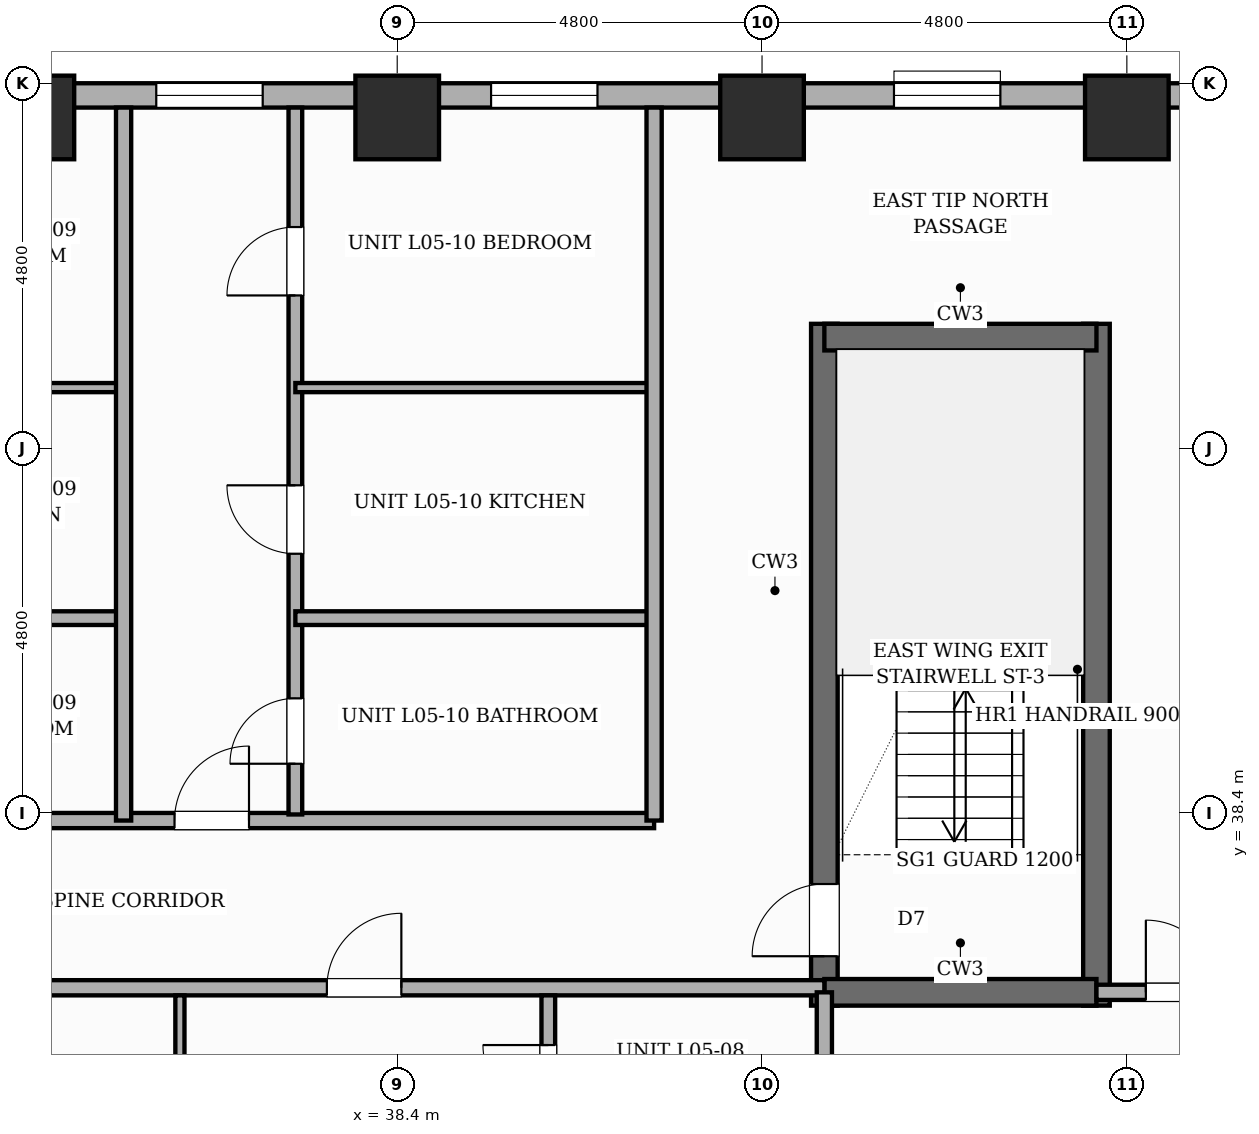
"""IFC4 building model, lengths in metres.
Left out: names, types, materials, properties, quantities, classifications, styles, units other than length and angle.
Written with IfcOpenShell. Run it as: python <this file> out.ifc"""

import sys

from ifc_helpers import new_model, si_unit, direction, frame, frame_2d, origin, origin_2d, place, context, subcontext, project, spatial, rectangle, extrude, element, fill, save


model = new_model("IFC4")
c1 = context("Model", 3, precision=1e-05, world=origin(), true_north=direction((0.0, 1.0)))
c2 = subcontext(c1, "Body", "Model", "MODEL_VIEW")
j1 = project(units=[si_unit("LENGTHUNIT", "METRE"), si_unit("PLANEANGLEUNIT", "RADIAN")], contexts=[c1])
p1 = place(None, origin())
s1 = spatial("IfcSite", under=j1, at=p1, CompositionType="ELEMENT")
p2 = place(p1, origin())
s2 = spatial("IfcBuilding", under=s1, at=p2, CompositionType="ELEMENT")
p3 = place(p2, frame((0.0, 0.0, 25.0)))
s3 = spatial("IfcBuildingStorey", under=s2, at=p3, CompositionType="ELEMENT", Elevation=25.0)
p4 = place(p3, frame((44.02, 35.865, 0.0), z_axis=(0.0, 0.0, 1.0), x_axis=(0.0, 1.0, 0.0)))
e1 = element("IfcWall", 1, at=p4, inside=s3, PredefinedType="SHEAR", context=c2, shape_type="SweptSolid", body=[
    extrude(rectangle(XDim=8.97, YDim=0.35, at=frame_2d((4.485, 0.0))), origin(), (0.0, 0.0, 1.0), 3.6),
])
p5 = place(p4, frame((0.65, 0.0, 0.0)))
e2 = element("IfcOpeningElement", 2, at=p5, cuts=e1, PredefinedType="OPENING", context=c2, shape_type="SweptSolid", body=[
    extrude(rectangle(XDim=0.95, YDim=2.1, at=frame_2d((0.475, 1.05))), frame((0.0, 0.185, 0.0), z_axis=(0.0, -1.0, 0.0), x_axis=(1.0, 0.0, 0.0)), (0.0, 0.0, 1.0), 0.37),
])
p6 = place(p3, frame((47.6, 35.865, 0.0), z_axis=(0.0, 0.0, 1.0), x_axis=(0.0, 1.0, 0.0)))
e3 = element("IfcWall", 3, at=p6, inside=s3, PredefinedType="SHEAR", context=c2, shape_type="SweptSolid", body=[
    extrude(rectangle(XDim=8.97, YDim=0.35, at=frame_2d((4.485, 0.0))), origin(), (0.0, 0.0, 1.0), 3.6),
])
for number, where, z_axis, x_axis in (
    (4, (44.02, 36.04, 0.0), (0.0, 0.0, 1.0), (1.0, 0.0, 0.0)),
    (5, (44.02, 44.66, 0.0), (0.0, 0.0, 1.0), (1.0, 0.0, 0.0)),
):
    element("IfcWall", number, at=place(p3, frame(where, z_axis=z_axis, x_axis=x_axis)), inside=s3, PredefinedType="SHEAR", context=c2, shape_type="SweptSolid", body=[
        extrude(rectangle(XDim=3.58, YDim=0.35, at=frame_2d((1.79, 0.0))), origin(), (0.0, 0.0, 1.0), 3.6),
    ])
for number, where, z_axis, x_axis in (
    (6, (33.6, 47.55, 0.0), (0.0, 0.0, 1.0), (1.0, 0.0, 0.0)),
    (7, (38.4, 47.55, 0.0), (0.0, 0.0, 1.0), (1.0, 0.0, 0.0)),
    (8, (43.2, 47.55, 0.0), (0.0, 0.0, 1.0), (1.0, 0.0, 0.0)),
    (9, (48.0, 47.55, 0.0), (0.0, 0.0, 1.0), (1.0, 0.0, 0.0)),
):
    element("IfcColumn", number, at=place(p3, frame(where, z_axis=z_axis, x_axis=x_axis)), inside=s3, PredefinedType="COLUMN", context=c2, shape_type="SweptSolid", body=[
        extrude(rectangle(XDim=1.1, YDim=1.1, at=origin_2d()), origin(), (0.0, 0.0, 1.0), 3.6),
    ])
p7 = place(p3, frame((7.2, 47.84, 0.0), z_axis=(0.0, 0.0, 1.0), x_axis=(1.0, 0.0, 0.0)))
e10 = element("IfcWall", 10, at=p7, inside=s3, PredefinedType="STANDARD", context=c2, shape_type="SweptSolid", body=[
    extrude(rectangle(XDim=48.0, YDim=0.32, at=frame_2d((24.0, 0.0))), origin(), (0.0, 0.0, 1.0), 2.53),
])
p8 = place(p7, frame((24.97, 0.0, 0.45)))
e11 = element("IfcOpeningElement", 11, at=p8, cuts=e10, PredefinedType="OPENING", context=c2, shape_type="SweptSolid", body=[
    extrude(rectangle(XDim=0.6, YDim=1.8, at=frame_2d((0.3, 0.9))), frame((0.0, 0.17, 0.0), z_axis=(0.0, -1.0, 0.0), x_axis=(1.0, 0.0, 0.0)), (0.0, 0.0, 1.0), 0.34),
])
p9 = place(p7, frame((32.435, 0.0, 0.65)))
e12 = element("IfcOpeningElement", 12, at=p9, cuts=e10, PredefinedType="OPENING", context=c2, shape_type="SweptSolid", body=[
    extrude(rectangle(XDim=1.4, YDim=1.1, at=frame_2d((0.7, 0.55))), frame((0.0, 0.17, 0.0), z_axis=(0.0, -1.0, 0.0), x_axis=(1.0, 0.0, 0.0)), (0.0, 0.0, 1.0), 0.34),
])
p10 = place(p7, frame((47.094, 0.0, 0.45)))
e13 = element("IfcOpeningElement", 13, at=p10, cuts=e10, PredefinedType="OPENING", context=c2, shape_type="SweptSolid", body=[
    extrude(rectangle(XDim=0.6, YDim=1.8, at=frame_2d((0.3, 0.9))), frame((0.0, 0.17, 0.0), z_axis=(0.0, -1.0, 0.0), x_axis=(1.0, 0.0, 0.0)), (0.0, 0.0, 1.0), 0.34),
])
p11 = place(p7, frame((18.74, 0.0, 0.45)))
e14 = element("IfcOpeningElement", 14, at=p11, cuts=e10, PredefinedType="OPENING", context=c2, shape_type="SweptSolid", body=[
    extrude(rectangle(XDim=0.95, YDim=1.8, at=frame_2d((0.475, 0.9))), frame((0.0, 0.17, 0.0), z_axis=(0.0, -1.0, 0.0), x_axis=(1.0, 0.0, 0.0)), (0.0, 0.0, 1.0), 0.34),
])
p12 = place(p7, frame((41.65, 0.0, 0.45)))
e15 = element("IfcOpeningElement", 15, at=p12, cuts=e10, PredefinedType="OPENING", context=c2, shape_type="SweptSolid", body=[
    extrude(rectangle(XDim=0.75, YDim=1.8, at=frame_2d((0.375, 0.9))), frame((0.0, 0.17, 0.0), z_axis=(0.0, -1.0, 0.0), x_axis=(1.0, 0.0, 0.0)), (0.0, 0.0, 1.0), 0.34),
])
p13 = place(p7, frame((37.736, 0.0, 0.65)))
e16 = element("IfcOpeningElement", 16, at=p13, cuts=e10, PredefinedType="OPENING", context=c2, shape_type="SweptSolid", body=[
    extrude(rectangle(XDim=1.4, YDim=1.1, at=frame_2d((0.7, 0.55))), frame((0.0, 0.17, 0.0), z_axis=(0.0, -1.0, 0.0), x_axis=(1.0, 0.0, 0.0)), (0.0, 0.0, 1.0), 0.34),
])
p14 = place(p7, frame((0.47, 0.0, 0.45)))
e17 = element("IfcOpeningElement", 17, at=p14, cuts=e10, PredefinedType="OPENING", context=c2, shape_type="SweptSolid", body=[
    extrude(rectangle(XDim=0.95, YDim=1.8, at=frame_2d((0.475, 0.9))), frame((0.0, 0.17, 0.0), z_axis=(0.0, -1.0, 0.0), x_axis=(1.0, 0.0, 0.0)), (0.0, 0.0, 1.0), 0.34),
])
p15 = place(p7, frame((10.215, 0.0, 0.45)))
e18 = element("IfcOpeningElement", 18, at=p15, cuts=e10, PredefinedType="OPENING", context=c2, shape_type="SweptSolid", body=[
    extrude(rectangle(XDim=0.95, YDim=1.8, at=frame_2d((0.475, 0.9))), frame((0.0, 0.17, 0.0), z_axis=(0.0, -1.0, 0.0), x_axis=(1.0, 0.0, 0.0)), (0.0, 0.0, 1.0), 0.34),
])
p16 = place(p7, frame((22.87, 0.0, 0.65)))
e19 = element("IfcOpeningElement", 19, at=p16, cuts=e10, PredefinedType="OPENING", context=c2, shape_type="SweptSolid", body=[
    extrude(rectangle(XDim=1.4, YDim=1.1, at=frame_2d((0.7, 0.55))), frame((0.0, 0.17, 0.0), z_axis=(0.0, -1.0, 0.0), x_axis=(1.0, 0.0, 0.0)), (0.0, 0.0, 1.0), 0.34),
])
p17 = place(p7, frame((28.03, 0.0, 0.65)))
e20 = element("IfcOpeningElement", 20, at=p17, cuts=e10, PredefinedType="OPENING", context=c2, shape_type="SweptSolid", body=[
    extrude(rectangle(XDim=1.4, YDim=1.1, at=frame_2d((0.7, 0.55))), frame((0.0, 0.17, 0.0), z_axis=(0.0, -1.0, 0.0), x_axis=(1.0, 0.0, 0.0)), (0.0, 0.0, 1.0), 0.34),
])
p18 = place(p7, frame((42.95, 0.0, 0.65)))
e21 = element("IfcOpeningElement", 21, at=p18, cuts=e10, PredefinedType="OPENING", context=c2, shape_type="SweptSolid", body=[
    extrude(rectangle(XDim=1.4, YDim=1.1, at=frame_2d((0.7, 0.55))), frame((0.0, 0.17, 0.0), z_axis=(0.0, -1.0, 0.0), x_axis=(1.0, 0.0, 0.0)), (0.0, 0.0, 1.0), 0.34),
])
p19 = place(p7, frame((45.984, 0.0, 0.45)))
e22 = element("IfcOpeningElement", 22, at=p19, cuts=e10, PredefinedType="OPENING", context=c2, shape_type="SweptSolid", body=[
    extrude(rectangle(XDim=0.6, YDim=1.8, at=frame_2d((0.3, 0.9))), frame((0.0, 0.17, 0.0), z_axis=(0.0, -1.0, 0.0), x_axis=(1.0, 0.0, 0.0)), (0.0, 0.0, 1.0), 0.34),
])
p20 = place(p3, frame((22.75, 36.1, 0.0), z_axis=(0.0, 0.0, 1.0), x_axis=(1.0, 0.0, 0.0)))
e23 = element("IfcWall", 23, at=p20, inside=s3, PredefinedType="PARTITIONING", context=c2, shape_type="SweptSolid", body=[
    extrude(rectangle(XDim=21.27, YDim=0.2, at=frame_2d((10.635, 0.0))), origin(), (0.0, 0.0, 1.0), 3.35),
])
p21 = place(p20, frame((1.628, 0.0, 0.0)))
e24 = element("IfcOpeningElement", 24, at=p21, cuts=e23, PredefinedType="OPENING", context=c2, shape_type="SweptSolid", body=[
    extrude(rectangle(XDim=0.98, YDim=2.18, at=frame_2d((0.49, 1.09))), frame((0.0, 0.11, 0.0), z_axis=(0.0, -1.0, 0.0), x_axis=(1.0, 0.0, 0.0)), (0.0, 0.0, 1.0), 0.22),
])
p22 = place(p20, frame((14.725, 0.0, 0.0)))
e25 = element("IfcOpeningElement", 25, at=p22, cuts=e23, PredefinedType="OPENING", context=c2, shape_type="SweptSolid", body=[
    extrude(rectangle(XDim=0.98, YDim=2.18, at=frame_2d((0.49, 1.09))), frame((0.0, 0.11, 0.0), z_axis=(0.0, -1.0, 0.0), x_axis=(1.0, 0.0, 0.0)), (0.0, 0.0, 1.0), 0.22),
])
p23 = place(p3, frame((27.35, 38.3, 0.0), z_axis=(0.0, 0.0, 1.0), x_axis=(1.0, 0.0, 0.0)))
e26 = element("IfcWall", 26, at=p23, inside=s3, PredefinedType="PARTITIONING", context=c2, shape_type="SweptSolid", body=[
    extrude(rectangle(XDim=14.43, YDim=0.2, at=frame_2d((7.215, 0.0))), origin(), (0.0, 0.0, 1.0), 3.35),
])
p24 = place(p23, frame((2.97, 0.0, 0.0)))
e27 = element("IfcOpeningElement", 27, at=p24, cuts=e26, PredefinedType="OPENING", context=c2, shape_type="SweptSolid", body=[
    extrude(rectangle(XDim=0.98, YDim=2.18, at=frame_2d((0.49, 1.09))), frame((0.0, 0.11, 0.0), z_axis=(0.0, -1.0, 0.0), x_axis=(1.0, 0.0, 0.0)), (0.0, 0.0, 1.0), 0.22),
])
p25 = place(p23, frame((8.12, 0.0, 0.0)))
e28 = element("IfcOpeningElement", 28, at=p25, cuts=e26, PredefinedType="OPENING", context=c2, shape_type="SweptSolid", body=[
    extrude(rectangle(XDim=0.98, YDim=2.18, at=frame_2d((0.49, 1.09))), frame((0.0, 0.11, 0.0), z_axis=(0.0, -1.0, 0.0), x_axis=(1.0, 0.0, 0.0)), (0.0, 0.0, 1.0), 0.22),
])
p26 = place(p3, frame((40.388, 29.12, 0.0), z_axis=(0.0, 0.0, 1.0), x_axis=(0.0, 1.0, 0.0)))
e29 = element("IfcWall", 29, at=p26, inside=s3, PredefinedType="PLUMBINGWALL", context=c2, shape_type="SweptSolid", body=[
    extrude(rectangle(XDim=6.88, YDim=0.18, at=frame_2d((3.44, 0.0))), origin(), (0.0, 0.0, 1.0), 3.35),
])
p27 = place(p26, frame((0.679, 0.0, 0.0)))
e30 = element("IfcOpeningElement", 30, at=p27, cuts=e29, PredefinedType="OPENING", context=c2, shape_type="SweptSolid", body=[
    extrude(rectangle(XDim=0.9, YDim=2.15, at=frame_2d((0.45, 1.075))), frame((0.0, 0.1, 0.0), z_axis=(0.0, -1.0, 0.0), x_axis=(1.0, 0.0, 0.0)), (0.0, 0.0, 1.0), 0.2),
])
p28 = place(p26, frame((3.315, 0.0, 0.0)))
e31 = element("IfcOpeningElement", 31, at=p28, cuts=e29, PredefinedType="OPENING", context=c2, shape_type="SweptSolid", body=[
    extrude(rectangle(XDim=0.9, YDim=2.15, at=frame_2d((0.45, 1.075))), frame((0.0, 0.1, 0.0), z_axis=(0.0, -1.0, 0.0), x_axis=(1.0, 0.0, 0.0)), (0.0, 0.0, 1.0), 0.2),
])
p29 = place(p26, frame((5.366, 0.0, 0.0)))
e32 = element("IfcOpeningElement", 32, at=p29, cuts=e29, PredefinedType="OPENING", context=c2, shape_type="SweptSolid", body=[
    extrude(rectangle(XDim=0.86, YDim=2.1, at=frame_2d((0.43, 1.05))), frame((0.0, 0.1, 0.0), z_axis=(0.0, -1.0, 0.0), x_axis=(1.0, 0.0, 0.0)), (0.0, 0.0, 1.0), 0.2),
])
p30 = place(p3, frame((35.541, 29.12, 0.0), z_axis=(0.0, 0.0, 1.0), x_axis=(0.0, 1.0, 0.0)))
e33 = element("IfcWall", 33, at=p30, inside=s3, PredefinedType="PARTITIONING", context=c2, shape_type="SweptSolid", body=[
    extrude(rectangle(XDim=6.88, YDim=0.12, at=frame_2d((3.44, 0.0))), origin(), (0.0, 0.0, 1.0), 3.35),
])
p31 = place(p30, frame((0.679, 0.0, 0.0)))
e34 = element("IfcOpeningElement", 34, at=p31, cuts=e33, PredefinedType="OPENING", context=c2, shape_type="SweptSolid", body=[
    extrude(rectangle(XDim=0.9, YDim=2.15, at=frame_2d((0.45, 1.075))), frame((0.0, 0.07, 0.0), z_axis=(0.0, -1.0, 0.0), x_axis=(1.0, 0.0, 0.0)), (0.0, 0.0, 1.0), 0.14),
])
p32 = place(p30, frame((4.149, 0.0, 0.0)))
e35 = element("IfcOpeningElement", 35, at=p32, cuts=e33, PredefinedType="OPENING", context=c2, shape_type="SweptSolid", body=[
    extrude(rectangle(XDim=0.9, YDim=2.15, at=frame_2d((0.45, 1.075))), frame((0.0, 0.07, 0.0), z_axis=(0.0, -1.0, 0.0), x_axis=(1.0, 0.0, 0.0)), (0.0, 0.0, 1.0), 0.14),
])
p33 = place(p3, frame((31.91, 40.963, 0.0), z_axis=(0.0, 0.0, 1.0), x_axis=(1.0, 0.0, 0.0)))
e36 = element("IfcWall", 36, at=p33, inside=s3, PredefinedType="PLUMBINGWALL", context=c2, shape_type="SweptSolid", body=[
    extrude(rectangle(XDim=2.91, YDim=0.18, at=frame_2d((1.455, 0.0))), origin(), (0.0, 0.0, 1.0), 3.35),
])
p34 = place(p3, frame((31.91, 43.996, 0.0), z_axis=(0.0, 0.0, 1.0), x_axis=(1.0, 0.0, 0.0)))
e37 = element("IfcWall", 37, at=p34, inside=s3, PredefinedType="PARTITIONING", context=c2, shape_type="SweptSolid", body=[
    extrude(rectangle(XDim=2.91, YDim=0.12, at=frame_2d((1.455, 0.0))), origin(), (0.0, 0.0, 1.0), 3.35),
])
p35 = place(p3, frame((34.8, 38.3, 0.0), z_axis=(0.0, 0.0, 1.0), x_axis=(0.0, 1.0, 0.0)))
e38 = element("IfcWall", 38, at=p35, inside=s3, PredefinedType="SOLIDWALL", context=c2, shape_type="SweptSolid", body=[
    extrude(rectangle(XDim=9.38, YDim=0.2, at=frame_2d((4.69, 0.0))), origin(), (0.0, 0.0, 1.0), 3.35),
])
p36 = place(p3, frame((37.06, 38.38, 0.0), z_axis=(0.0, 0.0, 1.0), x_axis=(0.0, 1.0, 0.0)))
e39 = element("IfcWall", 39, at=p36, inside=s3, PredefinedType="PLUMBINGWALL", context=c2, shape_type="SweptSolid", body=[
    extrude(rectangle(XDim=9.3, YDim=0.18, at=frame_2d((4.65, 0.0))), origin(), (0.0, 0.0, 1.0), 3.35),
])
p37 = place(p36, frame((0.667, 0.0, 0.0)))
e40 = element("IfcOpeningElement", 40, at=p37, cuts=e39, PredefinedType="OPENING", context=c2, shape_type="SweptSolid", body=[
    extrude(rectangle(XDim=0.86, YDim=2.1, at=frame_2d((0.43, 1.05))), frame((0.0, 0.1, 0.0), z_axis=(0.0, -1.0, 0.0), x_axis=(1.0, 0.0, 0.0)), (0.0, 0.0, 1.0), 0.2),
])
p38 = place(p36, frame((3.43, 0.0, 0.0)))
e41 = element("IfcOpeningElement", 41, at=p38, cuts=e39, PredefinedType="OPENING", context=c2, shape_type="SweptSolid", body=[
    extrude(rectangle(XDim=0.9, YDim=2.15, at=frame_2d((0.45, 1.075))), frame((0.0, 0.1, 0.0), z_axis=(0.0, -1.0, 0.0), x_axis=(1.0, 0.0, 0.0)), (0.0, 0.0, 1.0), 0.2),
])
p39 = place(p36, frame((6.828, 0.0, 0.0)))
e42 = element("IfcOpeningElement", 42, at=p39, cuts=e39, PredefinedType="OPENING", context=c2, shape_type="SweptSolid", body=[
    extrude(rectangle(XDim=0.9, YDim=2.15, at=frame_2d((0.45, 1.075))), frame((0.0, 0.1, 0.0), z_axis=(0.0, -1.0, 0.0), x_axis=(1.0, 0.0, 0.0)), (0.0, 0.0, 1.0), 0.2),
])
p40 = place(p3, frame((37.06, 40.963, 0.0), z_axis=(0.0, 0.0, 1.0), x_axis=(1.0, 0.0, 0.0)))
e43 = element("IfcWall", 43, at=p40, inside=s3, PredefinedType="PLUMBINGWALL", context=c2, shape_type="SweptSolid", body=[
    extrude(rectangle(XDim=4.64, YDim=0.18, at=frame_2d((2.32, 0.0))), origin(), (0.0, 0.0, 1.0), 3.35),
])
p41 = place(p3, frame((37.06, 43.996, 0.0), z_axis=(0.0, 0.0, 1.0), x_axis=(1.0, 0.0, 0.0)))
e44 = element("IfcWall", 44, at=p41, inside=s3, PredefinedType="PARTITIONING", context=c2, shape_type="SweptSolid", body=[
    extrude(rectangle(XDim=4.64, YDim=0.12, at=frame_2d((2.32, 0.0))), origin(), (0.0, 0.0, 1.0), 3.35),
])
p42 = place(p3, frame((41.78, 38.3, 0.0), z_axis=(0.0, 0.0, 1.0), x_axis=(0.0, 1.0, 0.0)))
e45 = element("IfcWall", 45, at=p42, inside=s3, PredefinedType="PARTITIONING", context=c2, shape_type="SweptSolid", body=[
    extrude(rectangle(XDim=9.38, YDim=0.2, at=frame_2d((4.69, 0.0))), origin(), (0.0, 0.0, 1.0), 3.35),
])
p43 = place(p3, frame((47.6, 36.04, 0.0), z_axis=(0.0, 0.0, 1.0), x_axis=(1.0, 0.0, 0.0)))
e46 = element("IfcWall", 46, at=p43, inside=s3, PredefinedType="PARTITIONING", context=c2, shape_type="SweptSolid", body=[
    extrude(rectangle(XDim=2.3, YDim=0.2, at=frame_2d((1.15, 0.0))), origin(), (0.0, 0.0, 1.0), 3.35),
])
p44 = place(p43, frame((0.65, 0.0, 0.0)))
e47 = element("IfcOpeningElement", 47, at=p44, cuts=e46, PredefinedType="OPENING", context=c2, shape_type="SweptSolid", body=[
    extrude(rectangle(XDim=0.95, YDim=2.15, at=frame_2d((0.475, 1.075))), frame((0.0, 0.11, 0.0), z_axis=(0.0, -1.0, 0.0), x_axis=(1.0, 0.0, 0.0)), (0.0, 0.0, 1.0), 0.22),
])
p45 = place(p3, frame((44.02, 29.12, 0.0), z_axis=(0.0, 0.0, 1.0), x_axis=(0.0, 1.0, 0.0)))
e48 = element("IfcWall", 48, at=p45, inside=s3, PredefinedType="SOLIDWALL", context=c2, shape_type="SweptSolid", body=[
    extrude(rectangle(XDim=6.92, YDim=0.2, at=frame_2d((3.46, 0.0))), origin(), (0.0, 0.0, 1.0), 3.35),
])
p46 = place(p9, origin())
e49 = element("IfcWindow", 49, at=p46, inside=s3, PartitioningType="SINGLE_PANEL", PredefinedType="WINDOW", context=c2, shape_type="SweptSolid", body=[
    extrude(rectangle(XDim=1.4, YDim=1.1, at=frame_2d((0.7, 0.55))), frame((0.0, 0.03, 0.0), z_axis=(0.0, -1.0, 0.0), x_axis=(1.0, 0.0, 0.0)), (0.0, 0.0, 1.0), 0.06),
])
fill(e12, e49)
p47 = place(p13, origin())
e50 = element("IfcWindow", 50, at=p47, inside=s3, PartitioningType="SINGLE_PANEL", PredefinedType="WINDOW", context=c2, shape_type="SweptSolid", body=[
    extrude(rectangle(XDim=1.4, YDim=1.1, at=frame_2d((0.7, 0.55))), frame((0.0, 0.03, 0.0), z_axis=(0.0, -1.0, 0.0), x_axis=(1.0, 0.0, 0.0)), (0.0, 0.0, 1.0), 0.06),
])
fill(e16, e50)
p48 = place(p17, origin())
e51 = element("IfcWindow", 51, at=p48, inside=s3, PartitioningType="SINGLE_PANEL", PredefinedType="WINDOW", context=c2, shape_type="SweptSolid", body=[
    extrude(rectangle(XDim=1.4, YDim=1.1, at=frame_2d((0.7, 0.55))), frame((0.0, 0.03, 0.0), z_axis=(0.0, -1.0, 0.0), x_axis=(1.0, 0.0, 0.0)), (0.0, 0.0, 1.0), 0.06),
])
fill(e20, e51)
p49 = place(p5, origin())
e52 = element("IfcDoor", 52, at=p49, inside=s3, OperationType="SINGLE_SWING_LEFT", PredefinedType="DOOR", context=c2, shape_type="SweptSolid", body=[
    extrude(rectangle(XDim=0.95, YDim=2.1, at=frame_2d((0.475, 1.05))), frame((0.0, 0.025, 0.0), z_axis=(0.0, -1.0, 0.0), x_axis=(1.0, 0.0, 0.0)), (0.0, 0.0, 1.0), 0.05),
])
fill(e2, e52)
p50 = place(p22, origin())
e53 = element("IfcDoor", 53, at=p50, inside=s3, OperationType="SINGLE_SWING_RIGHT", PredefinedType="DOOR", context=c2, shape_type="SweptSolid", body=[
    extrude(rectangle(XDim=0.98, YDim=2.18, at=frame_2d((0.49, 1.09))), frame((0.0, 0.025, 0.0), z_axis=(0.0, -1.0, 0.0), x_axis=(1.0, 0.0, 0.0)), (0.0, 0.0, 1.0), 0.05),
])
fill(e25, e53)
p51 = place(p29, origin())
e54 = element("IfcDoor", 54, at=p51, inside=s3, OperationType="SINGLE_SWING_RIGHT", PredefinedType="DOOR", context=c2, shape_type="SweptSolid", body=[
    extrude(rectangle(XDim=0.86, YDim=2.1, at=frame_2d((0.43, 1.05))), frame((0.0, 0.025, 0.0), z_axis=(0.0, -1.0, 0.0), x_axis=(1.0, 0.0, 0.0)), (0.0, 0.0, 1.0), 0.05),
])
fill(e32, e54)
p52 = place(p25, origin())
e55 = element("IfcDoor", 55, at=p52, inside=s3, OperationType="SINGLE_SWING_RIGHT", PredefinedType="DOOR", context=c2, shape_type="SweptSolid", body=[
    extrude(rectangle(XDim=0.98, YDim=2.18, at=frame_2d((0.49, 1.09))), frame((0.0, 0.025, 0.0), z_axis=(0.0, -1.0, 0.0), x_axis=(1.0, 0.0, 0.0)), (0.0, 0.0, 1.0), 0.05),
])
fill(e28, e55)
p53 = place(p37, origin())
e56 = element("IfcDoor", 56, at=p53, inside=s3, OperationType="SINGLE_SWING_LEFT", PredefinedType="DOOR", context=c2, shape_type="SweptSolid", body=[
    extrude(rectangle(XDim=0.86, YDim=2.1, at=frame_2d((0.43, 1.05))), frame((0.0, 0.025, 0.0), z_axis=(0.0, -1.0, 0.0), x_axis=(1.0, 0.0, 0.0)), (0.0, 0.0, 1.0), 0.05),
])
fill(e40, e56)
p54 = place(p38, origin())
e57 = element("IfcDoor", 57, at=p54, inside=s3, OperationType="SINGLE_SWING_RIGHT", PredefinedType="DOOR", context=c2, shape_type="SweptSolid", body=[
    extrude(rectangle(XDim=0.9, YDim=2.15, at=frame_2d((0.45, 1.075))), frame((0.0, 0.025, 0.0), z_axis=(0.0, -1.0, 0.0), x_axis=(1.0, 0.0, 0.0)), (0.0, 0.0, 1.0), 0.05),
])
fill(e41, e57)
p55 = place(p39, origin())
e58 = element("IfcDoor", 58, at=p55, inside=s3, OperationType="SINGLE_SWING_LEFT", PredefinedType="DOOR", context=c2, shape_type="SweptSolid", body=[
    extrude(rectangle(XDim=0.9, YDim=2.15, at=frame_2d((0.45, 1.075))), frame((0.0, 0.025, 0.0), z_axis=(0.0, -1.0, 0.0), x_axis=(1.0, 0.0, 0.0)), (0.0, 0.0, 1.0), 0.05),
])
fill(e42, e58)
p56 = place(p44, origin())
e59 = element("IfcDoor", 59, at=p56, inside=s3, OperationType="SINGLE_SWING_LEFT", PredefinedType="DOOR", context=c2, shape_type="SweptSolid", body=[
    extrude(rectangle(XDim=0.95, YDim=2.15, at=frame_2d((0.475, 1.075))), frame((0.0, 0.025, 0.0), z_axis=(0.0, -1.0, 0.0), x_axis=(1.0, 0.0, 0.0)), (0.0, 0.0, 1.0), 0.05),
])
fill(e47, e59)
save(model, sys.argv[1])
